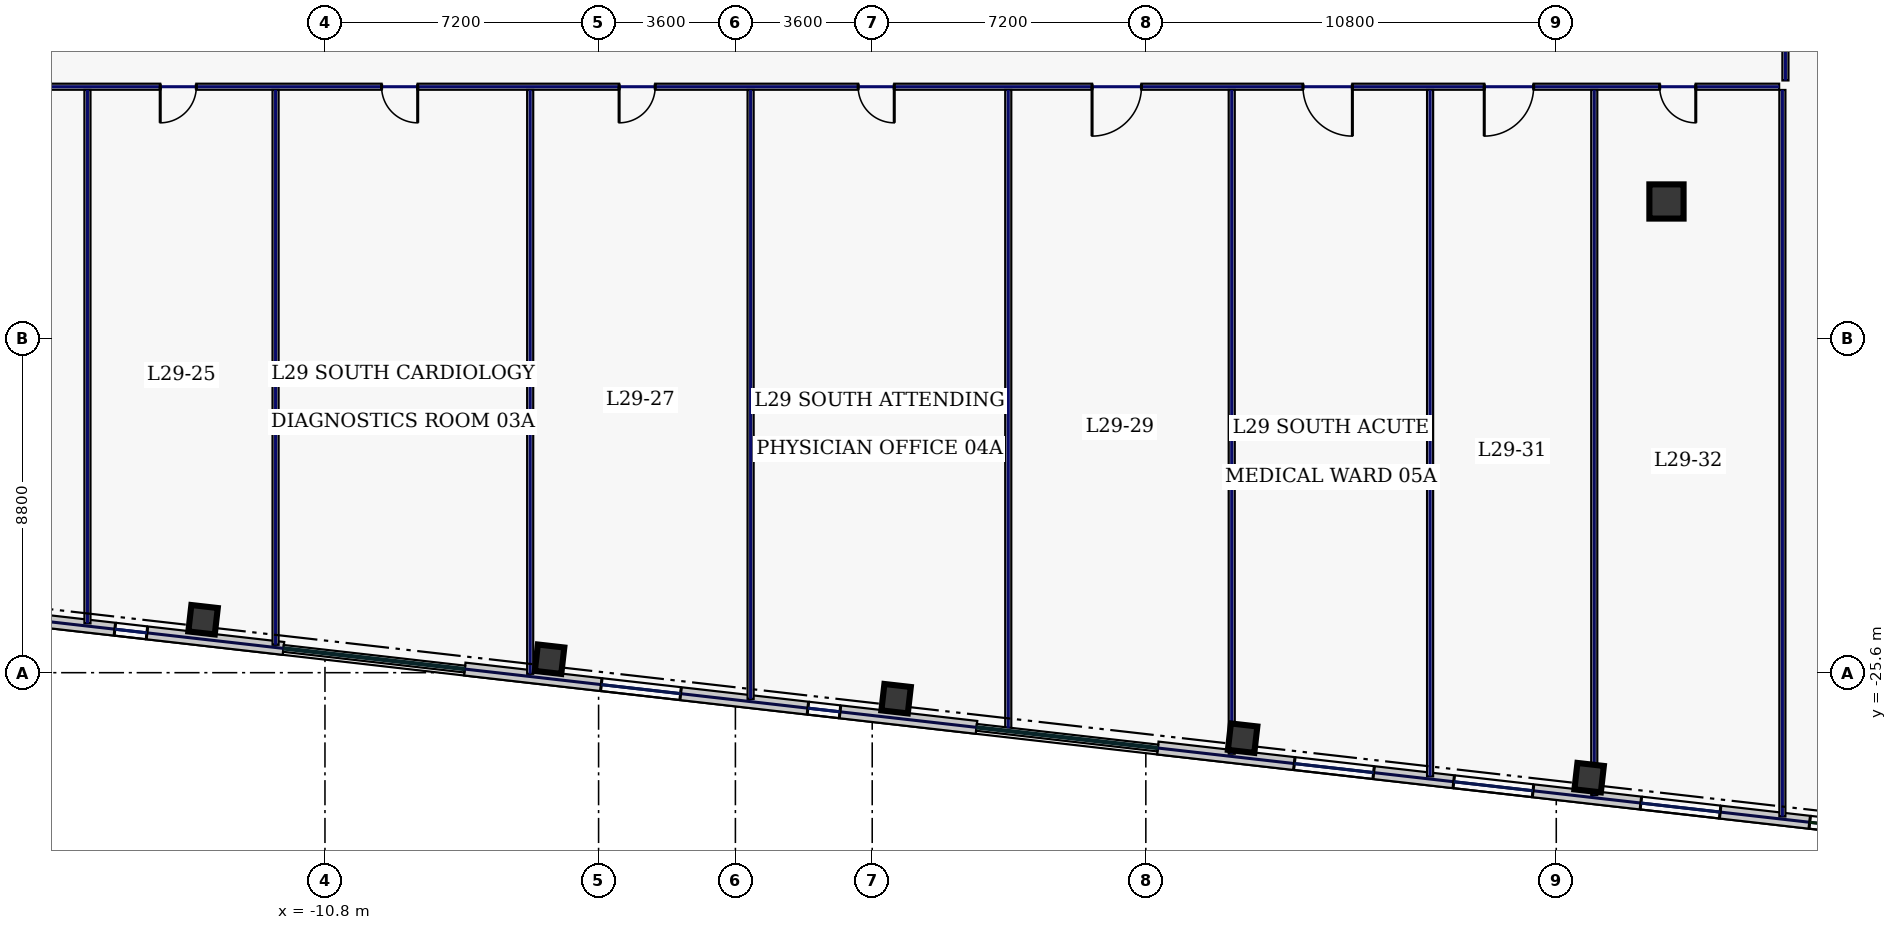
"""IFC4 building model, lengths in metres.
Left out: names, types, materials, properties, quantities, classifications, styles, units other than length and angle.
Written with IfcOpenShell. Run it as: python <this file> out.ifc"""

import sys

from ifc_helpers import new_model, si_unit, direction, frame, frame_2d, origin, origin_2d, place, context, subcontext, project, spatial, rectangle, hollow_rectangle, extrude, element, fill, save


model = new_model("IFC4")
c1 = context("Model", 3, precision=1e-05, world=origin(), true_north=direction((0.0, 1.0)))
c2 = subcontext(c1, "Body", "Model", "MODEL_VIEW")
j1 = project(units=[si_unit("LENGTHUNIT", "METRE"), si_unit("PLANEANGLEUNIT", "RADIAN")], contexts=[c1])
p1 = place(None, origin())
s1 = spatial("IfcSite", under=j1, at=p1, CompositionType="ELEMENT")
p2 = place(p1, origin())
s2 = spatial("IfcBuilding", under=s1, at=p2, CompositionType="ELEMENT")
p3 = place(p2, frame((0.0, 0.0, 129.4)))
s3 = spatial("IfcBuildingStorey", under=s2, at=p3, CompositionType="ELEMENT", Elevation=129.4)
p4 = place(p3, frame((24.5, -13.2, 0.0), z_axis=(0.0, 0.0, 1.0), x_axis=(1.0, 0.0, 0.0)))
e1 = element("IfcColumn", 1, at=p4, inside=s3, PredefinedType="COLUMN", context=c2, shape_type="SweptSolid", body=[
    extrude(hollow_rectangle(XDim=0.9, YDim=0.9, WallThickness=0.04, at=origin_2d()), origin(), (0.0, 0.0, 1.0), 3.74),
])
for number, where, z_axis, x_axis in (
    (2, (-14.008, -24.207, 0.0), (0.0, 0.0, 1.0), (0.994, -0.113, 0.0)),
    (3, (-4.89, -25.246, 0.0), (0.0, 0.0, 1.0), (0.994, -0.113, 0.0)),
    (4, (4.229, -26.284, 0.0), (0.0, 0.0, 1.0), (0.994, -0.113, 0.0)),
    (5, (13.347, -27.323, 0.0), (0.0, 0.0, 1.0), (0.994, -0.113, 0.0)),
    (6, (22.465, -28.362, 0.0), (0.0, 0.0, 1.0), (0.994, -0.113, 0.0)),
):
    element("IfcColumn", number, at=place(p3, frame(where, z_axis=z_axis, x_axis=x_axis)), inside=s3, PredefinedType="COLUMN", context=c2, shape_type="SweptSolid", body=[
        extrude(hollow_rectangle(XDim=0.7, YDim=0.7, WallThickness=0.032, at=origin_2d()), origin(), (0.0, 0.0, 1.0), 3.74),
    ])
p5 = place(p3, frame((-32.977, -22.559, 0.0), z_axis=(0.0, 0.0, 1.0), x_axis=(0.993571214605, -0.113208840243, 0.0)))
e7 = element("IfcWall", 7, at=p5, inside=s3, PredefinedType="STANDARD", context=c2, shape_type="SweptSolid", body=[
    extrude(rectangle(XDim=21.223, YDim=0.34, at=frame_2d((10.611, 0.0))), origin(), (0.0, 0.0, 1.0), 3.74),
])
p6 = place(p5, frame((2.108, 0.0, 0.67)))
e8 = element("IfcOpeningElement", 8, at=p6, cuts=e7, PredefinedType="OPENING", context=c2, shape_type="SweptSolid", body=[
    extrude(rectangle(XDim=2.1, YDim=2.2, at=frame_2d((1.05, 1.1))), frame((0.0, 0.18, 0.0), z_axis=(0.0, -1.0, 0.0), x_axis=(1.0, 0.0, 0.0)), (0.0, 0.0, 1.0), 0.36),
])
p7 = place(p5, frame((6.329, 0.0, 0.67)))
e9 = element("IfcOpeningElement", 9, at=p7, cuts=e7, PredefinedType="OPENING", context=c2, shape_type="SweptSolid", body=[
    extrude(rectangle(XDim=2.1, YDim=2.2, at=frame_2d((1.05, 1.1))), frame((0.0, 0.18, 0.0), z_axis=(0.0, -1.0, 0.0), x_axis=(1.0, 0.0, 0.0)), (0.0, 0.0, 1.0), 0.36),
])
p8 = place(p5, frame((11.285, 0.0, 0.67)))
e10 = element("IfcOpeningElement", 10, at=p8, cuts=e7, PredefinedType="OPENING", context=c2, shape_type="SweptSolid", body=[
    extrude(rectangle(XDim=2.1, YDim=2.2, at=frame_2d((1.05, 1.1))), frame((0.0, 0.18, 0.0), z_axis=(0.0, -1.0, 0.0), x_axis=(1.0, 0.0, 0.0)), (0.0, 0.0, 1.0), 0.36),
])
p9 = place(p5, frame((16.756, 0.0, 0.67)))
e11 = element("IfcOpeningElement", 11, at=p9, cuts=e7, PredefinedType="OPENING", context=c2, shape_type="SweptSolid", body=[
    extrude(rectangle(XDim=0.85, YDim=1.85, at=frame_2d((0.425, 0.925))), frame((0.0, 0.18, 0.0), z_axis=(0.0, -1.0, 0.0), x_axis=(1.0, 0.0, 0.0)), (0.0, 0.0, 1.0), 0.36),
])
p10 = place(p3, frame((-7.122, -25.504, 0.0), z_axis=(0.0, 0.0, 1.0), x_axis=(0.993571685551, -0.11320470693, 0.0)))
e12 = element("IfcWall", 12, at=p10, inside=s3, PredefinedType="STANDARD", context=c2, shape_type="SweptSolid", body=[
    extrude(rectangle(XDim=13.554, YDim=0.34, at=frame_2d((6.777, 0.0))), origin(), (0.0, 0.0, 1.0), 3.74),
])
p11 = place(p10, frame((3.616, 0.0, 0.67)))
e13 = element("IfcOpeningElement", 13, at=p11, cuts=e12, PredefinedType="OPENING", context=c2, shape_type="SweptSolid", body=[
    extrude(rectangle(XDim=2.1, YDim=2.2, at=frame_2d((1.05, 1.1))), frame((0.0, 0.18, 0.0), z_axis=(0.0, -1.0, 0.0), x_axis=(1.0, 0.0, 0.0)), (0.0, 0.0, 1.0), 0.36),
])
p12 = place(p10, frame((9.088, 0.0, 0.67)))
e14 = element("IfcOpeningElement", 14, at=p12, cuts=e12, PredefinedType="OPENING", context=c2, shape_type="SweptSolid", body=[
    extrude(rectangle(XDim=0.85, YDim=1.85, at=frame_2d((0.425, 0.925))), frame((0.0, 0.18, 0.0), z_axis=(0.0, -1.0, 0.0), x_axis=(1.0, 0.0, 0.0)), (0.0, 0.0, 1.0), 0.36),
])
p13 = place(p3, frame((11.115, -27.582, 0.0), z_axis=(0.0, 0.0, 1.0), x_axis=(0.993572655904, -0.113196190044, 0.0)))
e15 = element("IfcWall", 15, at=p13, inside=s3, PredefinedType="STANDARD", context=c2, shape_type="SweptSolid", body=[
    extrude(rectangle(XDim=21.223, YDim=0.34, at=frame_2d((10.611, 0.0))), origin(), (0.0, 0.0, 1.0), 3.74),
])
p14 = place(p13, frame((3.616, 0.0, 0.67)))
e16 = element("IfcOpeningElement", 16, at=p14, cuts=e15, PredefinedType="OPENING", context=c2, shape_type="SweptSolid", body=[
    extrude(rectangle(XDim=2.1, YDim=2.2, at=frame_2d((1.05, 1.1))), frame((0.0, 0.18, 0.0), z_axis=(0.0, -1.0, 0.0), x_axis=(1.0, 0.0, 0.0)), (0.0, 0.0, 1.0), 0.36),
])
p15 = place(p13, frame((7.838, 0.0, 0.67)))
e17 = element("IfcOpeningElement", 17, at=p15, cuts=e15, PredefinedType="OPENING", context=c2, shape_type="SweptSolid", body=[
    extrude(rectangle(XDim=2.1, YDim=2.2, at=frame_2d((1.05, 1.1))), frame((0.0, 0.18, 0.0), z_axis=(0.0, -1.0, 0.0), x_axis=(1.0, 0.0, 0.0)), (0.0, 0.0, 1.0), 0.36),
])
p16 = place(p13, frame((12.794, 0.0, 0.67)))
e18 = element("IfcOpeningElement", 18, at=p16, cuts=e15, PredefinedType="OPENING", context=c2, shape_type="SweptSolid", body=[
    extrude(rectangle(XDim=2.1, YDim=2.2, at=frame_2d((1.05, 1.1))), frame((0.0, 0.18, 0.0), z_axis=(0.0, -1.0, 0.0), x_axis=(1.0, 0.0, 0.0)), (0.0, 0.0, 1.0), 0.36),
])
p17 = place(p13, frame((17.265, 0.0, 0.22)))
e19 = element("IfcOpeningElement", 19, at=p17, cuts=e15, PredefinedType="OPENING", context=c2, shape_type="SweptSolid", body=[
    extrude(rectangle(XDim=1.6, YDim=1.2, at=frame_2d((0.8, 0.6))), frame((0.0, 0.18, 0.0), z_axis=(0.0, -1.0, 0.0), x_axis=(1.0, 0.0, 0.0)), (0.0, 0.0, 1.0), 0.36),
])
p18 = place(p3, frame((27.63, 10.115, 0.0), z_axis=(0.0, 0.0, 1.0), x_axis=(0.0, -1.0, 0.0)))
e20 = element("IfcWall", 20, at=p18, inside=s3, PredefinedType="PARTITIONING", context=c2, shape_type="SweptSolid", body=[
    extrude(rectangle(XDim=20.13, YDim=0.16, at=frame_2d((10.065, 0.0))), origin(), (0.0, 0.0, 1.0), 3.74),
])
p19 = place(p18, frame((17.181, 0.0, 0.0)))
e21 = element("IfcOpeningElement", 21, at=p19, cuts=e20, PredefinedType="OPENING", context=c2, shape_type="SweptSolid", body=[
    extrude(rectangle(XDim=0.95, YDim=2.2, at=frame_2d((0.475, 1.1))), frame((0.0, 0.09, 0.0), z_axis=(0.0, -1.0, 0.0), x_axis=(1.0, 0.0, 0.0)), (0.0, 0.0, 1.0), 0.18),
])
p20 = place(p18, frame((12.325, 0.0, 0.0)))
e22 = element("IfcOpeningElement", 22, at=p20, cuts=e20, PredefinedType="OPENING", context=c2, shape_type="SweptSolid", body=[
    extrude(rectangle(XDim=0.95, YDim=2.2, at=frame_2d((0.475, 1.1))), frame((0.0, 0.09, 0.0), z_axis=(0.0, -1.0, 0.0), x_axis=(1.0, 0.0, 0.0)), (0.0, 0.0, 1.0), 0.18),
])
p21 = place(p18, frame((7.125, 0.0, 0.0)))
e23 = element("IfcOpeningElement", 23, at=p21, cuts=e20, PredefinedType="OPENING", context=c2, shape_type="SweptSolid", body=[
    extrude(rectangle(XDim=0.95, YDim=2.2, at=frame_2d((0.475, 1.1))), frame((0.0, 0.09, 0.0), z_axis=(0.0, -1.0, 0.0), x_axis=(1.0, 0.0, 0.0)), (0.0, 0.0, 1.0), 0.18),
])
p22 = place(p18, frame((2.219, 0.0, 0.0)))
e24 = element("IfcOpeningElement", 24, at=p22, cuts=e20, PredefinedType="OPENING", context=c2, shape_type="SweptSolid", body=[
    extrude(rectangle(XDim=0.95, YDim=2.2, at=frame_2d((0.475, 1.1))), frame((0.0, 0.09, 0.0), z_axis=(0.0, -1.0, 0.0), x_axis=(1.0, 0.0, 0.0)), (0.0, 0.0, 1.0), 0.18),
])
p23 = place(p3, frame((27.465, -10.18, 0.0), z_axis=(0.0, 0.0, 1.0), x_axis=(-1.0, 0.0, 0.0)))
e25 = element("IfcWall", 25, at=p23, inside=s3, PredefinedType="PARTITIONING", context=c2, shape_type="SweptSolid", body=[
    extrude(rectangle(XDim=54.93, YDim=0.16, at=frame_2d((27.465, 0.0))), origin(), (0.0, 0.0, 1.0), 3.74),
])
p24 = place(p23, frame((52.106, 0.0, 0.0)))
e26 = element("IfcOpeningElement", 26, at=p24, cuts=e25, PredefinedType="OPENING", context=c2, shape_type="SweptSolid", body=[
    extrude(rectangle(XDim=0.95, YDim=2.2, at=frame_2d((0.475, 1.1))), frame((0.0, 0.09, 0.0), z_axis=(0.0, -1.0, 0.0), x_axis=(1.0, 0.0, 0.0)), (0.0, 0.0, 1.0), 0.18),
])
p25 = place(p23, frame((47.05, 0.0, 0.0)))
e27 = element("IfcOpeningElement", 27, at=p25, cuts=e25, PredefinedType="OPENING", context=c2, shape_type="SweptSolid", body=[
    extrude(rectangle(XDim=0.95, YDim=2.2, at=frame_2d((0.475, 1.1))), frame((0.0, 0.09, 0.0), z_axis=(0.0, -1.0, 0.0), x_axis=(1.0, 0.0, 0.0)), (0.0, 0.0, 1.0), 0.18),
])
p26 = place(p23, frame((41.65, 0.0, 0.0)))
e28 = element("IfcOpeningElement", 28, at=p26, cuts=e25, PredefinedType="OPENING", context=c2, shape_type="SweptSolid", body=[
    extrude(rectangle(XDim=0.95, YDim=2.2, at=frame_2d((0.475, 1.1))), frame((0.0, 0.09, 0.0), z_axis=(0.0, -1.0, 0.0), x_axis=(1.0, 0.0, 0.0)), (0.0, 0.0, 1.0), 0.18),
])
p27 = place(p23, frame((35.825, 0.0, 0.0)))
e29 = element("IfcOpeningElement", 29, at=p27, cuts=e25, PredefinedType="OPENING", context=c2, shape_type="SweptSolid", body=[
    extrude(rectangle(XDim=0.95, YDim=2.2, at=frame_2d((0.475, 1.1))), frame((0.0, 0.09, 0.0), z_axis=(0.0, -1.0, 0.0), x_axis=(1.0, 0.0, 0.0)), (0.0, 0.0, 1.0), 0.18),
])
p28 = place(p23, frame((29.575, 0.0, 0.0)))
e30 = element("IfcOpeningElement", 30, at=p28, cuts=e25, PredefinedType="OPENING", context=c2, shape_type="SweptSolid", body=[
    extrude(rectangle(XDim=0.95, YDim=2.2, at=frame_2d((0.475, 1.1))), frame((0.0, 0.09, 0.0), z_axis=(0.0, -1.0, 0.0), x_axis=(1.0, 0.0, 0.0)), (0.0, 0.0, 1.0), 0.18),
])
p29 = place(p23, frame((23.285, 0.0, 0.0)))
e31 = element("IfcOpeningElement", 31, at=p29, cuts=e25, PredefinedType="OPENING", context=c2, shape_type="SweptSolid", body=[
    extrude(rectangle(XDim=0.95, YDim=2.2, at=frame_2d((0.475, 1.1))), frame((0.0, 0.09, 0.0), z_axis=(0.0, -1.0, 0.0), x_axis=(1.0, 0.0, 0.0)), (0.0, 0.0, 1.0), 0.18),
])
p30 = place(p23, frame((16.78, 0.0, 0.0)))
e32 = element("IfcOpeningElement", 32, at=p30, cuts=e25, PredefinedType="OPENING", context=c2, shape_type="SweptSolid", body=[
    extrude(rectangle(XDim=1.3, YDim=2.2, at=frame_2d((0.65, 1.1))), frame((0.0, 0.09, 0.0), z_axis=(0.0, -1.0, 0.0), x_axis=(1.0, 0.0, 0.0)), (0.0, 0.0, 1.0), 0.18),
])
p31 = place(p23, frame((11.23, 0.0, 0.0)))
e33 = element("IfcOpeningElement", 33, at=p31, cuts=e25, PredefinedType="OPENING", context=c2, shape_type="SweptSolid", body=[
    extrude(rectangle(XDim=1.3, YDim=2.2, at=frame_2d((0.65, 1.1))), frame((0.0, 0.09, 0.0), z_axis=(0.0, -1.0, 0.0), x_axis=(1.0, 0.0, 0.0)), (0.0, 0.0, 1.0), 0.18),
])
p32 = place(p23, frame((6.46, 0.0, 0.0)))
e34 = element("IfcOpeningElement", 34, at=p32, cuts=e25, PredefinedType="OPENING", context=c2, shape_type="SweptSolid", body=[
    extrude(rectangle(XDim=1.3, YDim=2.2, at=frame_2d((0.65, 1.1))), frame((0.0, 0.09, 0.0), z_axis=(0.0, -1.0, 0.0), x_axis=(1.0, 0.0, 0.0)), (0.0, 0.0, 1.0), 0.18),
])
p33 = place(p23, frame((2.194, 0.0, 0.0)))
e35 = element("IfcOpeningElement", 35, at=p33, cuts=e25, PredefinedType="OPENING", context=c2, shape_type="SweptSolid", body=[
    extrude(rectangle(XDim=0.95, YDim=2.2, at=frame_2d((0.475, 1.1))), frame((0.0, 0.09, 0.0), z_axis=(0.0, -1.0, 0.0), x_axis=(1.0, 0.0, 0.0)), (0.0, 0.0, 1.0), 0.18),
])
p34 = place(p3, frame((27.55, -29.385, 0.0), z_axis=(0.0, 0.0, 1.0), x_axis=(0.0, 1.0, 0.0)))
e36 = element("IfcWall", 36, at=p34, inside=s3, PredefinedType="PARTITIONING", context=c2, shape_type="SweptSolid", body=[
    extrude(rectangle(XDim=19.12, YDim=0.16, at=frame_2d((9.56, 0.0))), origin(), (0.0, 0.0, 1.0), 3.74),
])
p35 = place(p3, frame((-12.1, -24.867, 0.0), z_axis=(0.0, 0.0, 1.0), x_axis=(0.0, 1.0, 0.0)))
e37 = element("IfcWall", 37, at=p35, inside=s3, PredefinedType="PARTITIONING", context=c2, shape_type="SweptSolid", body=[
    extrude(rectangle(XDim=14.602, YDim=0.16, at=frame_2d((7.301, 0.0))), origin(), (0.0, 0.0, 1.0), 3.74),
])
p36 = place(p3, frame((0.4, -26.291, 0.0), z_axis=(0.0, 0.0, 1.0), x_axis=(0.0, 1.0, 0.0)))
e38 = element("IfcWall", 38, at=p36, inside=s3, PredefinedType="PARTITIONING", context=c2, shape_type="SweptSolid", body=[
    extrude(rectangle(XDim=16.026, YDim=0.16, at=frame_2d((8.013, 0.0))), origin(), (0.0, 0.0, 1.0), 3.74),
])
p37 = place(p3, frame((13.06, -27.733, 0.0), z_axis=(0.0, 0.0, 1.0), x_axis=(0.0, 1.0, 0.0)))
e39 = element("IfcWall", 39, at=p37, inside=s3, PredefinedType="PARTITIONING", context=c2, shape_type="SweptSolid", body=[
    extrude(rectangle(XDim=17.469, YDim=0.16, at=frame_2d((8.734, 0.0))), origin(), (0.0, 0.0, 1.0), 3.74),
])
p38 = place(p3, frame((22.6, -28.82, 0.0), z_axis=(0.0, 0.0, 1.0), x_axis=(0.0, 1.0, 0.0)))
e40 = element("IfcWall", 40, at=p38, inside=s3, PredefinedType="PARTITIONING", context=c2, shape_type="SweptSolid", body=[
    extrude(rectangle(XDim=18.555, YDim=0.16, at=frame_2d((9.278, 0.0))), origin(), (0.0, 0.0, 1.0), 3.235),
])
p39 = place(p3, frame((-17.05, -24.303, 0.0), z_axis=(0.0, 0.0, 1.0), x_axis=(0.0, 1.0, 0.0)))
e41 = element("IfcWall", 41, at=p39, inside=s3, PredefinedType="PARTITIONING", context=c2, shape_type="SweptSolid", body=[
    extrude(rectangle(XDim=14.038, YDim=0.16, at=frame_2d((7.019, 0.0))), origin(), (0.0, 0.0, 1.0), 3.74),
])
p40 = place(p3, frame((-5.4, -25.63, 0.0), z_axis=(0.0, 0.0, 1.0), x_axis=(0.0, 1.0, 0.0)))
e42 = element("IfcWall", 42, at=p40, inside=s3, PredefinedType="PARTITIONING", context=c2, shape_type="SweptSolid", body=[
    extrude(rectangle(XDim=15.365, YDim=0.16, at=frame_2d((7.683, 0.0))), origin(), (0.0, 0.0, 1.0), 3.74),
])
p41 = place(p3, frame((7.18, -27.063, 0.0), z_axis=(0.0, 0.0, 1.0), x_axis=(0.0, 1.0, 0.0)))
e43 = element("IfcWall", 43, at=p41, inside=s3, PredefinedType="PARTITIONING", context=c2, shape_type="SweptSolid", body=[
    extrude(rectangle(XDim=16.799, YDim=0.16, at=frame_2d((8.399, 0.0))), origin(), (0.0, 0.0, 1.0), 3.74),
])
p42 = place(p3, frame((18.28, -28.328, 0.0), z_axis=(0.0, 0.0, 1.0), x_axis=(0.0, 1.0, 0.0)))
e44 = element("IfcWall", 44, at=p42, inside=s3, PredefinedType="PARTITIONING", context=c2, shape_type="SweptSolid", body=[
    extrude(rectangle(XDim=18.063, YDim=0.16, at=frame_2d((9.032, 0.0))), origin(), (0.0, 0.0, 1.0), 3.74),
])
p43 = place(p9, origin())
e45 = element("IfcWindow", 45, at=p43, inside=s3, PartitioningType="SINGLE_PANEL", PredefinedType="WINDOW", context=c2, shape_type="SweptSolid", body=[
    extrude(rectangle(XDim=0.85, YDim=1.85, at=frame_2d((0.425, 0.925))), frame((0.0, 0.03, 0.0), z_axis=(0.0, -1.0, 0.0), x_axis=(1.0, 0.0, 0.0)), (0.0, 0.0, 1.0), 0.06),
])
fill(e11, e45)
p44 = place(p11, origin())
e46 = element("IfcWindow", 46, at=p44, inside=s3, PartitioningType="SINGLE_PANEL", PredefinedType="WINDOW", context=c2, shape_type="SweptSolid", body=[
    extrude(rectangle(XDim=2.1, YDim=2.2, at=frame_2d((1.05, 1.1))), frame((0.0, 0.03, 0.0), z_axis=(0.0, -1.0, 0.0), x_axis=(1.0, 0.0, 0.0)), (0.0, 0.0, 1.0), 0.06),
])
fill(e13, e46)
p45 = place(p12, origin())
e47 = element("IfcWindow", 47, at=p45, inside=s3, PartitioningType="SINGLE_PANEL", PredefinedType="WINDOW", context=c2, shape_type="SweptSolid", body=[
    extrude(rectangle(XDim=0.85, YDim=1.85, at=frame_2d((0.425, 0.925))), frame((0.0, 0.03, 0.0), z_axis=(0.0, -1.0, 0.0), x_axis=(1.0, 0.0, 0.0)), (0.0, 0.0, 1.0), 0.06),
])
fill(e14, e47)
p46 = place(p14, origin())
e48 = element("IfcWindow", 48, at=p46, inside=s3, PartitioningType="SINGLE_PANEL", PredefinedType="WINDOW", context=c2, shape_type="SweptSolid", body=[
    extrude(rectangle(XDim=2.1, YDim=2.2, at=frame_2d((1.05, 1.1))), frame((0.0, 0.03, 0.0), z_axis=(0.0, -1.0, 0.0), x_axis=(1.0, 0.0, 0.0)), (0.0, 0.0, 1.0), 0.06),
])
fill(e16, e48)
p47 = place(p15, origin())
e49 = element("IfcWindow", 49, at=p47, inside=s3, PartitioningType="SINGLE_PANEL", PredefinedType="WINDOW", context=c2, shape_type="SweptSolid", body=[
    extrude(rectangle(XDim=2.1, YDim=2.2, at=frame_2d((1.05, 1.1))), frame((0.0, 0.03, 0.0), z_axis=(0.0, -1.0, 0.0), x_axis=(1.0, 0.0, 0.0)), (0.0, 0.0, 1.0), 0.06),
])
fill(e17, e49)
p48 = place(p16, origin())
e50 = element("IfcWindow", 50, at=p48, inside=s3, PartitioningType="SINGLE_PANEL", PredefinedType="WINDOW", context=c2, shape_type="SweptSolid", body=[
    extrude(rectangle(XDim=2.1, YDim=2.2, at=frame_2d((1.05, 1.1))), frame((0.0, 0.03, 0.0), z_axis=(0.0, -1.0, 0.0), x_axis=(1.0, 0.0, 0.0)), (0.0, 0.0, 1.0), 0.06),
])
fill(e18, e50)
p49 = place(p17, origin())
e51 = element("IfcWindow", 51, at=p49, inside=s3, PartitioningType="SINGLE_PANEL", PredefinedType="WINDOW", context=c2, shape_type="SweptSolid", body=[
    extrude(rectangle(XDim=1.6, YDim=1.2, at=frame_2d((0.8, 0.6))), frame((0.0, 0.03, 0.0), z_axis=(0.0, -1.0, 0.0), x_axis=(1.0, 0.0, 0.0)), (0.0, 0.0, 1.0), 0.06),
])
fill(e19, e51)
p50 = place(p26, origin())
e52 = element("IfcDoor", 52, at=p50, inside=s3, OperationType="SINGLE_SWING_RIGHT", PredefinedType="DOOR", context=c2, shape_type="SweptSolid", body=[
    extrude(rectangle(XDim=0.95, YDim=2.2, at=frame_2d((0.475, 1.1))), frame((0.0, 0.025, 0.0), z_axis=(0.0, -1.0, 0.0), x_axis=(1.0, 0.0, 0.0)), (0.0, 0.0, 1.0), 0.05),
])
fill(e28, e52)
p51 = place(p27, origin())
e53 = element("IfcDoor", 53, at=p51, inside=s3, OperationType="SINGLE_SWING_LEFT", PredefinedType="DOOR", context=c2, shape_type="SweptSolid", body=[
    extrude(rectangle(XDim=0.95, YDim=2.2, at=frame_2d((0.475, 1.1))), frame((0.0, 0.025, 0.0), z_axis=(0.0, -1.0, 0.0), x_axis=(1.0, 0.0, 0.0)), (0.0, 0.0, 1.0), 0.05),
])
fill(e29, e53)
p52 = place(p28, origin())
e54 = element("IfcDoor", 54, at=p52, inside=s3, OperationType="SINGLE_SWING_RIGHT", PredefinedType="DOOR", context=c2, shape_type="SweptSolid", body=[
    extrude(rectangle(XDim=0.95, YDim=2.2, at=frame_2d((0.475, 1.1))), frame((0.0, 0.025, 0.0), z_axis=(0.0, -1.0, 0.0), x_axis=(1.0, 0.0, 0.0)), (0.0, 0.0, 1.0), 0.05),
])
fill(e30, e54)
p53 = place(p29, origin())
e55 = element("IfcDoor", 55, at=p53, inside=s3, OperationType="SINGLE_SWING_LEFT", PredefinedType="DOOR", context=c2, shape_type="SweptSolid", body=[
    extrude(rectangle(XDim=0.95, YDim=2.2, at=frame_2d((0.475, 1.1))), frame((0.0, 0.025, 0.0), z_axis=(0.0, -1.0, 0.0), x_axis=(1.0, 0.0, 0.0)), (0.0, 0.0, 1.0), 0.05),
])
fill(e31, e55)
p54 = place(p30, origin())
e56 = element("IfcDoor", 56, at=p54, inside=s3, OperationType="SINGLE_SWING_RIGHT", PredefinedType="DOOR", context=c2, shape_type="SweptSolid", body=[
    extrude(rectangle(XDim=1.3, YDim=2.2, at=frame_2d((0.65, 1.1))), frame((0.0, 0.025, 0.0), z_axis=(0.0, -1.0, 0.0), x_axis=(1.0, 0.0, 0.0)), (0.0, 0.0, 1.0), 0.05),
])
fill(e32, e56)
p55 = place(p31, origin())
e57 = element("IfcDoor", 57, at=p55, inside=s3, OperationType="SINGLE_SWING_LEFT", PredefinedType="DOOR", context=c2, shape_type="SweptSolid", body=[
    extrude(rectangle(XDim=1.3, YDim=2.2, at=frame_2d((0.65, 1.1))), frame((0.0, 0.025, 0.0), z_axis=(0.0, -1.0, 0.0), x_axis=(1.0, 0.0, 0.0)), (0.0, 0.0, 1.0), 0.05),
])
fill(e33, e57)
p56 = place(p32, origin())
e58 = element("IfcDoor", 58, at=p56, inside=s3, OperationType="SINGLE_SWING_RIGHT", PredefinedType="DOOR", context=c2, shape_type="SweptSolid", body=[
    extrude(rectangle(XDim=1.3, YDim=2.2, at=frame_2d((0.65, 1.1))), frame((0.0, 0.025, 0.0), z_axis=(0.0, -1.0, 0.0), x_axis=(1.0, 0.0, 0.0)), (0.0, 0.0, 1.0), 0.05),
])
fill(e34, e58)
p57 = place(p33, origin())
e59 = element("IfcDoor", 59, at=p57, inside=s3, OperationType="SINGLE_SWING_LEFT", PredefinedType="DOOR", context=c2, shape_type="SweptSolid", body=[
    extrude(rectangle(XDim=0.95, YDim=2.2, at=frame_2d((0.475, 1.1))), frame((0.0, 0.025, 0.0), z_axis=(0.0, -1.0, 0.0), x_axis=(1.0, 0.0, 0.0)), (0.0, 0.0, 1.0), 0.05),
])
fill(e35, e59)
save(model, sys.argv[1])
